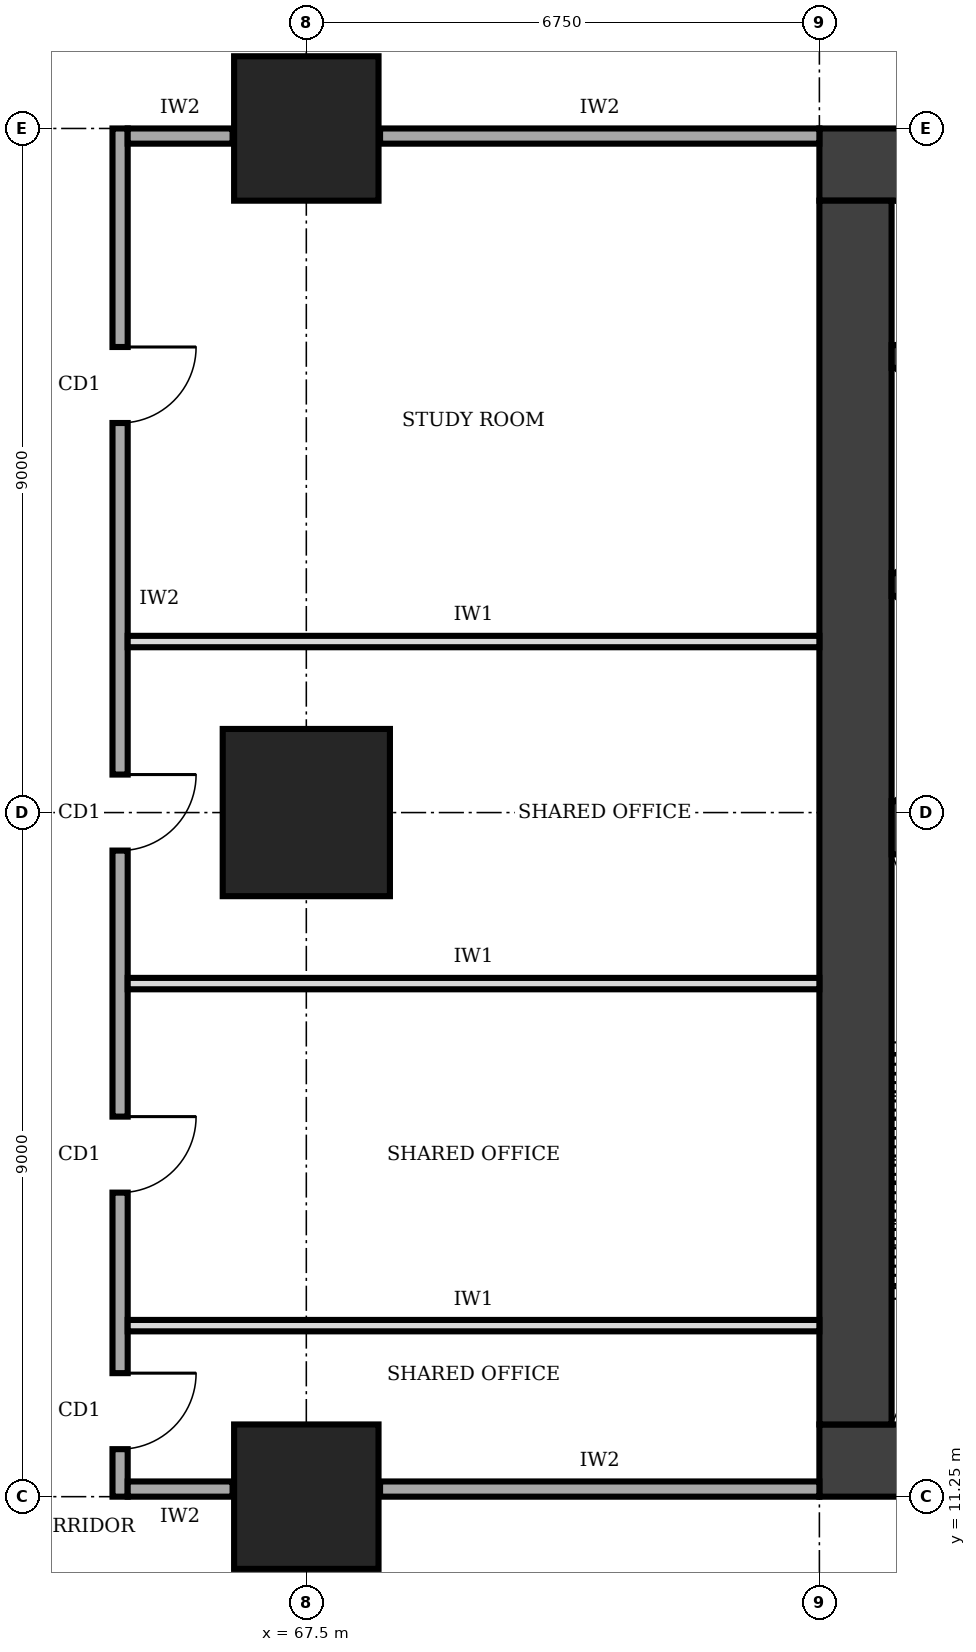
"""IFC4 building model, lengths in metres.
Left out: names, types, materials, properties, quantities, classifications, styles, units other than length and angle.
Written with IfcOpenShell. Run it as: python <this file> out.ifc"""

import sys

from ifc_helpers import new_model, si_unit, direction, frame, frame_2d, origin, origin_2d, place, context, subcontext, project, spatial, rectangle, extrude, element, fill, save


model = new_model("IFC4")
c1 = context("Model", 3, precision=1e-05, world=origin(), true_north=direction((0.0, 1.0)))
c2 = subcontext(c1, "Body", "Model", "MODEL_VIEW")
j1 = project(units=[si_unit("LENGTHUNIT", "METRE"), si_unit("PLANEANGLEUNIT", "RADIAN")], contexts=[c1])
p1 = place(None, origin())
s1 = spatial("IfcSite", under=j1, at=p1, CompositionType="ELEMENT")
p2 = place(p1, origin())
s2 = spatial("IfcBuilding", under=s1, at=p2, CompositionType="ELEMENT")
p3 = place(p2, frame((0.0, 0.0, 153.0)))
s3 = spatial("IfcBuildingStorey", under=s2, at=p3, CompositionType="ELEMENT", Elevation=153.0)
p4 = place(p3, frame((74.25, 11.725, 0.0), z_axis=(0.0, 0.0, 1.0), x_axis=(1.0, 0.0, 0.0)))
e1 = element("IfcWall", 1, at=p4, inside=s3, PredefinedType="SHEAR", context=c2, shape_type="SweptSolid", body=[
    extrude(rectangle(XDim=13.5, YDim=0.95, at=frame_2d((6.75, 0.0))), origin(), (0.0, 0.0, 1.0), 4.0),
])
p5 = place(p4, frame((4.75, 0.0, 0.0)))
e2 = element("IfcOpeningElement", 2, at=p5, cuts=e1, PredefinedType="OPENING", context=c2, shape_type="SweptSolid", body=[
    extrude(rectangle(XDim=1.0, YDim=2.1, at=frame_2d((0.5, 1.05))), frame((0.0, 0.485, 0.0), z_axis=(0.0, -1.0, 0.0), x_axis=(1.0, 0.0, 0.0)), (0.0, 0.0, 1.0), 0.97),
])
p6 = place(p3, frame((87.75, 28.775, 0.0), z_axis=(0.0, 0.0, 1.0), x_axis=(-1.0, 0.0, 0.0)))
e3 = element("IfcWall", 3, at=p6, inside=s3, PredefinedType="SHEAR", context=c2, shape_type="SweptSolid", body=[
    extrude(rectangle(XDim=13.5, YDim=0.95, at=frame_2d((6.75, 0.0))), origin(), (0.0, 0.0, 1.0), 4.0),
])
p7 = place(p6, frame((4.75, 0.0, 0.0)))
e4 = element("IfcOpeningElement", 4, at=p7, cuts=e3, PredefinedType="OPENING", context=c2, shape_type="SweptSolid", body=[
    extrude(rectangle(XDim=1.8, YDim=2.1, at=frame_2d((0.9, 1.05))), frame((0.0, 0.485, 0.0), z_axis=(0.0, -1.0, 0.0), x_axis=(1.0, 0.0, 0.0)), (0.0, 0.0, 1.0), 0.97),
])
p8 = place(p3, frame((74.725, 28.3, 0.0), z_axis=(0.0, 0.0, 1.0), x_axis=(0.0, -1.0, 0.0)))
e5 = element("IfcWall", 5, at=p8, inside=s3, PredefinedType="SHEAR", context=c2, shape_type="SweptSolid", body=[
    extrude(rectangle(XDim=16.1, YDim=0.95, at=frame_2d((8.05, 0.0))), origin(), (0.0, 0.0, 1.0), 4.0),
])
p9 = place(p3, frame((75.2, 20.05, 0.0), z_axis=(0.0, 0.0, 1.0), x_axis=(1.0, 0.0, 0.0)))
e6 = element("IfcWall", 6, at=p9, inside=s3, PredefinedType="SHEAR", context=c2, shape_type="SweptSolid", body=[
    extrude(rectangle(XDim=3.4, YDim=0.7, at=frame_2d((1.7, 0.0))), origin(), (0.0, 0.0, 1.0), 4.0),
])
for number, where, z_axis, x_axis in (
    (7, (75.2, 23.25, 0.0), (0.0, 0.0, 1.0), (1.0, 0.0, 0.0)),
    (8, (75.2, 26.25, 0.0), (0.0, 0.0, 1.0), (1.0, 0.0, 0.0)),
):
    element("IfcWall", number, at=place(p3, frame(where, z_axis=z_axis, x_axis=x_axis)), inside=s3, PredefinedType="SHEAR", context=c2, shape_type="SweptSolid", body=[
        extrude(rectangle(XDim=3.4, YDim=0.3, at=frame_2d((1.7, 0.0))), origin(), (0.0, 0.0, 1.0), 4.0),
    ])
p10 = place(p3, frame((67.5, 11.25, 0.0), z_axis=(0.0, 0.0, 1.0), x_axis=(1.0, 0.0, 0.0)))
e9 = element("IfcColumn", 9, at=p10, inside=s3, PredefinedType="COLUMN", context=c2, shape_type="SweptSolid", body=[
    extrude(rectangle(XDim=1.9, YDim=1.9, at=origin_2d()), origin(), (0.0, 0.0, 1.0), 4.0),
])
p11 = place(p3, frame((67.5, 20.25, 0.0), z_axis=(0.0, 0.0, 1.0), x_axis=(1.0, 0.0, 0.0)))
e10 = element("IfcColumn", 10, at=p11, inside=s3, PredefinedType="COLUMN", context=c2, shape_type="SweptSolid", body=[
    extrude(rectangle(XDim=2.2, YDim=2.2, at=origin_2d()), origin(), (0.0, 0.0, 1.0), 4.0),
])
p12 = place(p3, frame((67.5, 29.25, 0.0), z_axis=(0.0, 0.0, 1.0), x_axis=(1.0, 0.0, 0.0)))
e11 = element("IfcColumn", 11, at=p12, inside=s3, PredefinedType="COLUMN", context=c2, shape_type="SweptSolid", body=[
    extrude(rectangle(XDim=1.9, YDim=1.9, at=origin_2d()), origin(), (0.0, 0.0, 1.0), 4.0),
])
p13 = place(p3, frame((65.05, 29.25, 0.0), z_axis=(0.0, 0.0, 1.0), x_axis=(0.0, -1.0, 0.0)))
e12 = element("IfcWall", 12, at=p13, inside=s3, PredefinedType="SOLIDWALL", context=c2, shape_type="SweptSolid", body=[
    extrude(rectangle(XDim=18.0, YDim=0.2, at=frame_2d((9.0, 0.0))), origin(), (0.0, 0.0, 1.0), 3.75),
])
p14 = place(p13, frame((16.375, 0.0, 0.0)))
e13 = element("IfcOpeningElement", 13, at=p14, cuts=e12, PredefinedType="OPENING", context=c2, shape_type="SweptSolid", body=[
    extrude(rectangle(XDim=1.0, YDim=2.1, at=frame_2d((0.5, 1.05))), frame((0.0, 0.11, 0.0), z_axis=(0.0, -1.0, 0.0), x_axis=(1.0, 0.0, 0.0)), (0.0, 0.0, 1.0), 0.22),
])
p15 = place(p13, frame((13.0, 0.0, 0.0)))
e14 = element("IfcOpeningElement", 14, at=p15, cuts=e12, PredefinedType="OPENING", context=c2, shape_type="SweptSolid", body=[
    extrude(rectangle(XDim=1.0, YDim=2.1, at=frame_2d((0.5, 1.05))), frame((0.0, 0.11, 0.0), z_axis=(0.0, -1.0, 0.0), x_axis=(1.0, 0.0, 0.0)), (0.0, 0.0, 1.0), 0.22),
])
p16 = place(p13, frame((8.5, 0.0, 0.0)))
e15 = element("IfcOpeningElement", 15, at=p16, cuts=e12, PredefinedType="OPENING", context=c2, shape_type="SweptSolid", body=[
    extrude(rectangle(XDim=1.0, YDim=2.1, at=frame_2d((0.5, 1.05))), frame((0.0, 0.11, 0.0), z_axis=(0.0, -1.0, 0.0), x_axis=(1.0, 0.0, 0.0)), (0.0, 0.0, 1.0), 0.22),
])
p17 = place(p13, frame((2.875, 0.0, 0.0)))
e16 = element("IfcOpeningElement", 16, at=p17, cuts=e12, PredefinedType="OPENING", context=c2, shape_type="SweptSolid", body=[
    extrude(rectangle(XDim=1.0, YDim=2.1, at=frame_2d((0.5, 1.05))), frame((0.0, 0.11, 0.0), z_axis=(0.0, -1.0, 0.0), x_axis=(1.0, 0.0, 0.0)), (0.0, 0.0, 1.0), 0.22),
])
p18 = place(p3, frame((65.15, 11.35, 0.0), z_axis=(0.0, 0.0, 1.0), x_axis=(1.0, 0.0, 0.0)))
e17 = element("IfcWall", 17, at=p18, inside=s3, PredefinedType="SOLIDWALL", context=c2, shape_type="SweptSolid", body=[
    extrude(rectangle(XDim=1.38, YDim=0.2, at=frame_2d((0.69, 0.0))), origin(), (0.0, 0.0, 1.0), 2.85),
])
p19 = place(p3, frame((68.47, 11.35, 0.0), z_axis=(0.0, 0.0, 1.0), x_axis=(1.0, 0.0, 0.0)))
e18 = element("IfcWall", 18, at=p19, inside=s3, PredefinedType="SOLIDWALL", context=c2, shape_type="SweptSolid", body=[
    extrude(rectangle(XDim=5.78, YDim=0.2, at=frame_2d((2.89, 0.0))), origin(), (0.0, 0.0, 1.0), 2.85),
])
p20 = place(p3, frame((65.15, 29.15, 0.0), z_axis=(0.0, 0.0, 1.0), x_axis=(1.0, 0.0, 0.0)))
e19 = element("IfcWall", 19, at=p20, inside=s3, PredefinedType="SOLIDWALL", context=c2, shape_type="SweptSolid", body=[
    extrude(rectangle(XDim=1.38, YDim=0.2, at=frame_2d((0.69, 0.0))), origin(), (0.0, 0.0, 1.0), 2.85),
])
p21 = place(p3, frame((68.47, 29.15, 0.0), z_axis=(0.0, 0.0, 1.0), x_axis=(1.0, 0.0, 0.0)))
e20 = element("IfcWall", 20, at=p21, inside=s3, PredefinedType="SOLIDWALL", context=c2, shape_type="SweptSolid", body=[
    extrude(rectangle(XDim=5.78, YDim=0.2, at=frame_2d((2.89, 0.0))), origin(), (0.0, 0.0, 1.0), 2.85),
])
for number, where, z_axis, x_axis in (
    (21, (65.15, 13.5, 0.0), (0.0, 0.0, 1.0), (1.0, 0.0, 0.0)),
    (22, (65.15, 18.0, 0.0), (0.0, 0.0, 1.0), (1.0, 0.0, 0.0)),
    (23, (65.15, 22.5, 0.0), (0.0, 0.0, 1.0), (1.0, 0.0, 0.0)),
):
    element("IfcWall", number, at=place(p3, frame(where, z_axis=z_axis, x_axis=x_axis)), inside=s3, PredefinedType="PARTITIONING", context=c2, shape_type="SweptSolid", body=[
        extrude(rectangle(XDim=9.1, YDim=0.15, at=frame_2d((4.55, 0.0))), origin(), (0.0, 0.0, 1.0), 3.75),
    ])
p22 = place(p14, origin())
e24 = element("IfcDoor", 24, at=p22, inside=s3, OperationType="SINGLE_SWING_LEFT", PredefinedType="DOOR", context=c2, shape_type="SweptSolid", body=[
    extrude(rectangle(XDim=1.0, YDim=2.1, at=frame_2d((0.5, 1.05))), frame((0.0, 0.025, 0.0), z_axis=(0.0, -1.0, 0.0), x_axis=(1.0, 0.0, 0.0)), (0.0, 0.0, 1.0), 0.05),
])
fill(e13, e24)
p23 = place(p15, origin())
e25 = element("IfcDoor", 25, at=p23, inside=s3, OperationType="SINGLE_SWING_LEFT", PredefinedType="DOOR", context=c2, shape_type="SweptSolid", body=[
    extrude(rectangle(XDim=1.0, YDim=2.1, at=frame_2d((0.5, 1.05))), frame((0.0, 0.025, 0.0), z_axis=(0.0, -1.0, 0.0), x_axis=(1.0, 0.0, 0.0)), (0.0, 0.0, 1.0), 0.05),
])
fill(e14, e25)
p24 = place(p16, origin())
e26 = element("IfcDoor", 26, at=p24, inside=s3, OperationType="SINGLE_SWING_LEFT", PredefinedType="DOOR", context=c2, shape_type="SweptSolid", body=[
    extrude(rectangle(XDim=1.0, YDim=2.1, at=frame_2d((0.5, 1.05))), frame((0.0, 0.025, 0.0), z_axis=(0.0, -1.0, 0.0), x_axis=(1.0, 0.0, 0.0)), (0.0, 0.0, 1.0), 0.05),
])
fill(e15, e26)
p25 = place(p17, origin())
e27 = element("IfcDoor", 27, at=p25, inside=s3, OperationType="SINGLE_SWING_LEFT", PredefinedType="DOOR", context=c2, shape_type="SweptSolid", body=[
    extrude(rectangle(XDim=1.0, YDim=2.1, at=frame_2d((0.5, 1.05))), frame((0.0, 0.025, 0.0), z_axis=(0.0, -1.0, 0.0), x_axis=(1.0, 0.0, 0.0)), (0.0, 0.0, 1.0), 0.05),
])
fill(e16, e27)
save(model, sys.argv[1])
